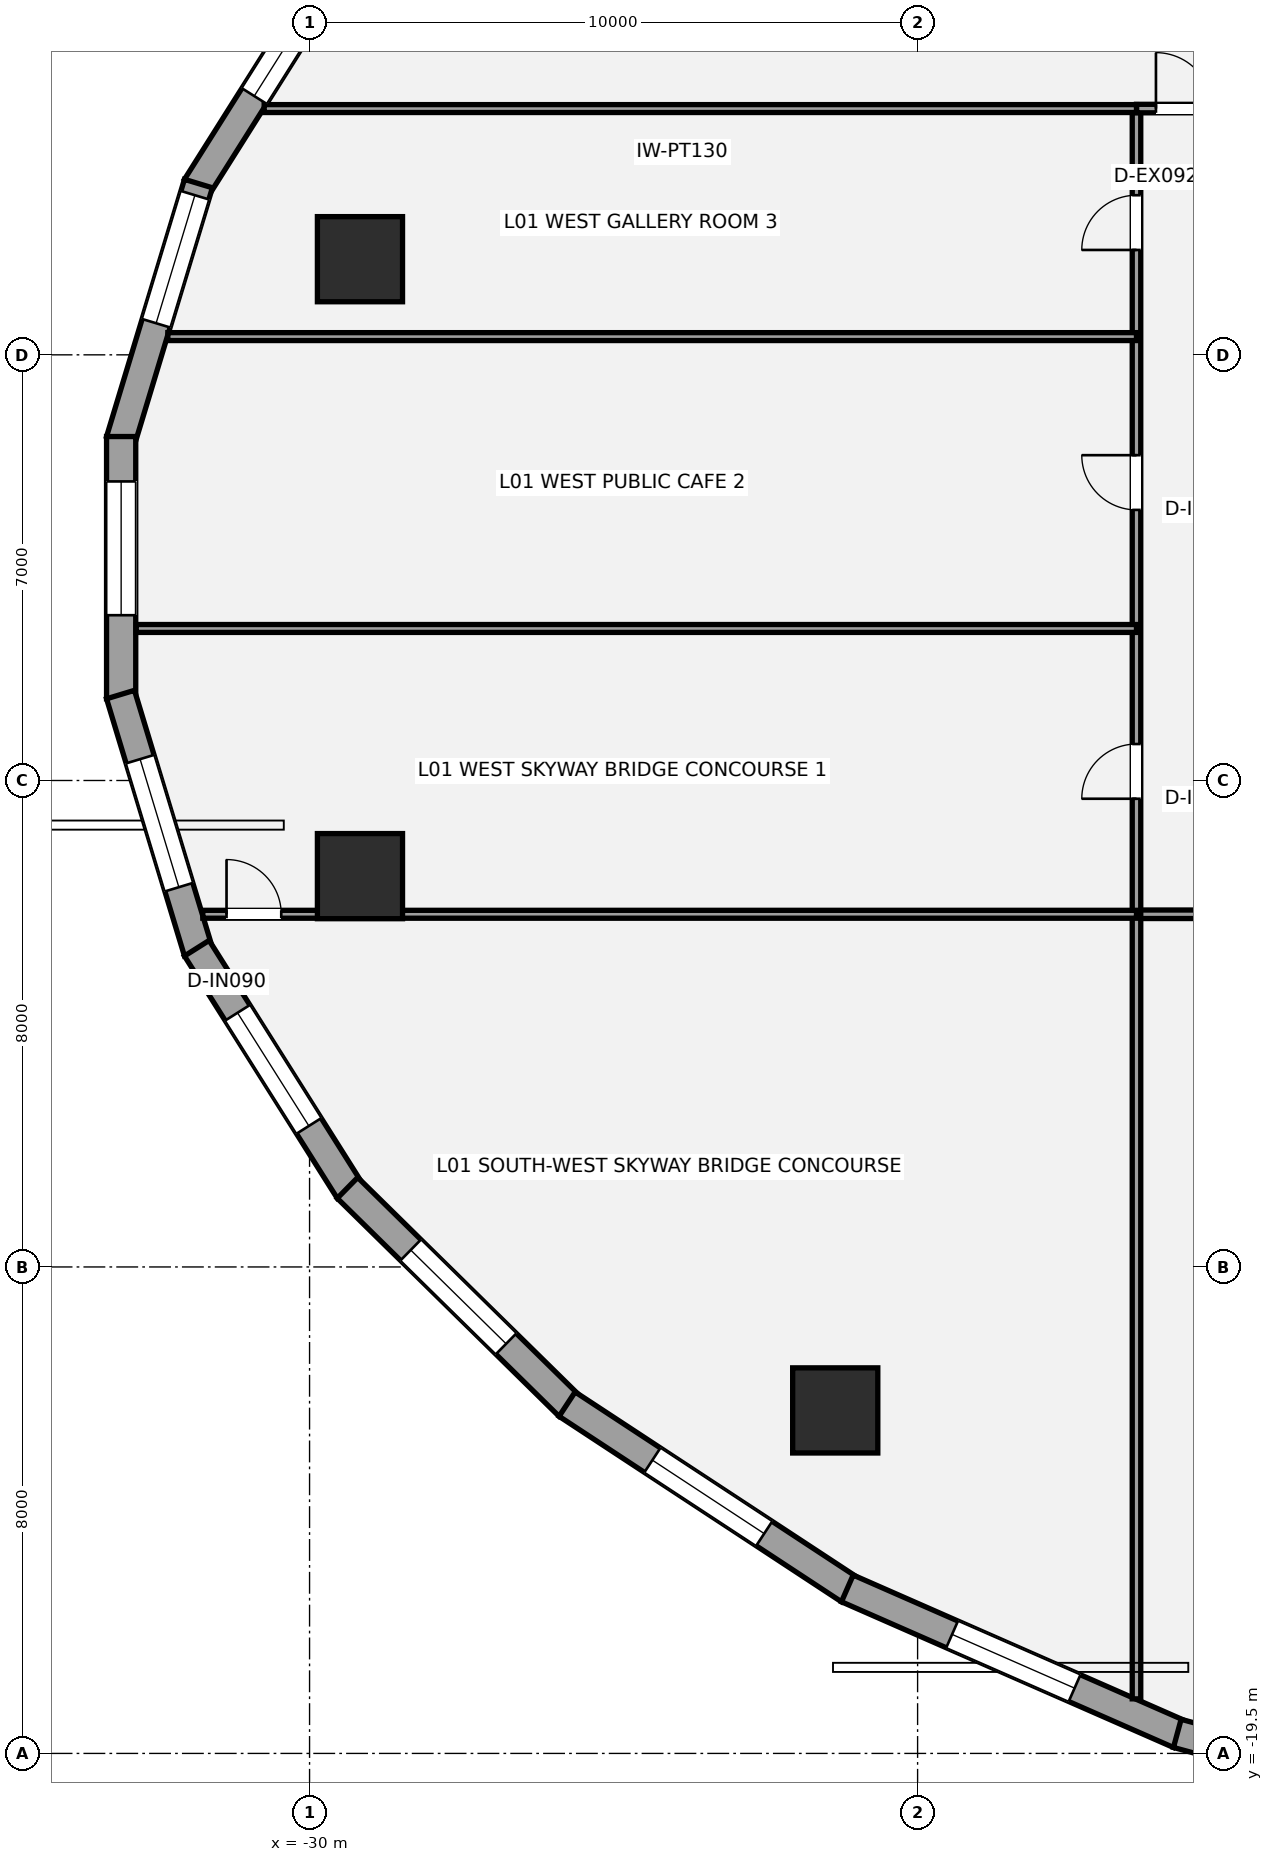
"""IFC4 building model, lengths in metres.
Left out: names, types, materials, properties, quantities, classifications, styles, units other than length and angle.
Written with IfcOpenShell. Run it as: python <this file> out.ifc"""

import sys

from ifc_helpers import new_model, si_unit, direction, frame, frame_2d, origin, origin_2d, place, context, subcontext, project, spatial, rectangle, hollow_circle, extrude, element, fill, save


model = new_model("IFC4")
c1 = context("Model", 3, precision=1e-05, world=origin(), true_north=direction((0.0, 1.0)))
c2 = subcontext(c1, "Body", "Model", "MODEL_VIEW")
j1 = project(units=[si_unit("LENGTHUNIT", "METRE"), si_unit("PLANEANGLEUNIT", "RADIAN")], contexts=[c1])
p1 = place(None, origin())
s1 = spatial("IfcSite", under=j1, at=p1, CompositionType="ELEMENT")
p2 = place(p1, origin())
s2 = spatial("IfcBuilding", under=s1, at=p2, CompositionType="ELEMENT")
p3 = place(p2, frame((0.0, 0.0, 6.0)))
s3 = spatial("IfcBuildingStorey", under=s2, at=p3, CompositionType="ELEMENT", Elevation=6.0)
for number, where, z_axis, x_axis in (
    (1, (-29.171, 5.073, 0.0), (0.0, 0.0, 1.0), (1.0, 0.0, 0.0)),
    (2, (-29.171, -5.073, 0.0), (0.0, 0.0, 1.0), (1.0, 0.0, 0.0)),
    (3, (-21.354, -13.859, 0.0), (0.0, 0.0, 1.0), (1.0, 0.0, 0.0)),
):
    element("IfcColumn", number, at=place(p3, frame(where, z_axis=z_axis, x_axis=x_axis)), inside=s3, PredefinedType="USERDEFINED", context=c2, shape_type="SweptSolid", body=[
        extrude(hollow_circle(Radius=0.7, WallThickness=0.05, at=origin_2d()), origin(), (0.0, 0.0, 1.0), 4.2),
    ])
p4 = place(p3, frame((-31.854, 6.258, 0.0), z_axis=(0.0, 0.0, 1.0), x_axis=(0.53349762721, 0.845801561693, 0.0)))
e4 = element("IfcWall", 4, at=p4, inside=s3, PredefinedType="STANDARD", context=c2, shape_type="SweptSolid", body=[
    extrude(rectangle(XDim=4.711, YDim=0.48, at=frame_2d((2.355, 0.0))), origin(), (0.0, 0.0, 1.0), 3.109),
])
p5 = place(p4, frame((1.771, 0.0, 0.7)))
e5 = element("IfcOpeningElement", 5, at=p5, cuts=e4, PredefinedType="OPENING", context=c2, shape_type="SweptSolid", body=[
    extrude(rectangle(XDim=2.2, YDim=1.95, at=frame_2d((1.1, 0.975))), frame((0.0, 0.25, 0.0), z_axis=(0.0, -1.0, 0.0), x_axis=(1.0, 0.0, 0.0)), (0.0, 0.0, 1.0), 0.5),
])
p6 = place(p3, frame((-33.109, 2.087, 0.0), z_axis=(0.0, 0.0, 1.0), x_axis=(0.289855603468, 0.957070388811, 0.0)))
e6 = element("IfcWall", 6, at=p6, inside=s3, PredefinedType="STANDARD", context=c2, shape_type="SweptSolid", body=[
    extrude(rectangle(XDim=4.419, YDim=0.48, at=frame_2d((2.21, 0.0))), origin(), (0.0, 0.0, 1.0), 3.109),
])
p7 = place(p6, frame((2.02, 0.0, 0.7)))
e7 = element("IfcOpeningElement", 7, at=p7, cuts=e6, PredefinedType="OPENING", context=c2, shape_type="SweptSolid", body=[
    extrude(rectangle(XDim=2.2, YDim=1.95, at=frame_2d((1.1, 0.975))), frame((0.0, 0.25, 0.0), z_axis=(0.0, -1.0, 0.0), x_axis=(1.0, 0.0, 0.0)), (0.0, 0.0, 1.0), 0.5),
])
p8 = place(p3, frame((-33.099, -2.156, 0.0), z_axis=(0.0, 0.0, 1.0), x_axis=(0.0, 1.0, 0.0)))
e8 = element("IfcWall", 8, at=p8, inside=s3, PredefinedType="STANDARD", context=c2, shape_type="SweptSolid", body=[
    extrude(rectangle(XDim=4.313, YDim=0.48, at=frame_2d((2.156, 0.0))), origin(), (0.0, 0.0, 1.0), 3.109),
])
p9 = place(p8, frame((1.375, 0.0, 0.7)))
e9 = element("IfcOpeningElement", 9, at=p9, cuts=e8, PredefinedType="OPENING", context=c2, shape_type="SweptSolid", body=[
    extrude(rectangle(XDim=2.2, YDim=1.95, at=frame_2d((1.1, 0.975))), frame((0.0, 0.25, 0.0), z_axis=(0.0, -1.0, 0.0), x_axis=(1.0, 0.0, 0.0)), (0.0, 0.0, 1.0), 0.5),
])
p10 = place(p3, frame((-31.828, -6.317, 0.0), z_axis=(0.0, 0.0, 1.0), x_axis=(-0.289855603468, 0.957070388811, 0.0)))
e10 = element("IfcWall", 10, at=p10, inside=s3, PredefinedType="STANDARD", context=c2, shape_type="SweptSolid", body=[
    extrude(rectangle(XDim=4.419, YDim=0.48, at=frame_2d((2.21, 0.0))), origin(), (0.0, 0.0, 1.0), 3.109),
])
p11 = place(p10, frame((1.11, 0.0, 0.7)))
e11 = element("IfcOpeningElement", 11, at=p11, cuts=e10, PredefinedType="OPENING", context=c2, shape_type="SweptSolid", body=[
    extrude(rectangle(XDim=2.2, YDim=1.95, at=frame_2d((1.1, 0.975))), frame((0.0, 0.25, 0.0), z_axis=(0.0, -1.0, 0.0), x_axis=(1.0, 0.0, 0.0)), (0.0, 0.0, 1.0), 0.5),
])
p12 = place(p3, frame((-29.341, -10.243, 0.0), z_axis=(0.0, 0.0, 1.0), x_axis=(-0.53349762721, 0.845801561693, 0.0)))
e12 = element("IfcWall", 12, at=p12, inside=s3, PredefinedType="STANDARD", context=c2, shape_type="SweptSolid", body=[
    extrude(rectangle(XDim=4.711, YDim=0.48, at=frame_2d((2.355, 0.0))), origin(), (0.0, 0.0, 1.0), 3.109),
])
p13 = place(p12, frame((1.255, 0.0, 0.7)))
e13 = element("IfcOpeningElement", 13, at=p13, cuts=e12, PredefinedType="OPENING", context=c2, shape_type="SweptSolid", body=[
    extrude(rectangle(XDim=2.2, YDim=1.95, at=frame_2d((1.1, 0.975))), frame((0.0, 0.25, 0.0), z_axis=(0.0, -1.0, 0.0), x_axis=(1.0, 0.0, 0.0)), (0.0, 0.0, 1.0), 0.5),
])
p14 = place(p3, frame((-25.728, -13.785, 0.0), z_axis=(0.0, 0.0, 1.0), x_axis=(-0.713189080178, 0.700971708355, 0.0)))
e14 = element("IfcWall", 14, at=p14, inside=s3, PredefinedType="STANDARD", context=c2, shape_type="SweptSolid", body=[
    extrude(rectangle(XDim=5.116, YDim=0.48, at=frame_2d((2.558, 0.0))), origin(), (0.0, 0.0, 1.0), 3.109),
])
p15 = place(p14, frame((1.458, 0.0, 0.7)))
e15 = element("IfcOpeningElement", 15, at=p15, cuts=e14, PredefinedType="OPENING", context=c2, shape_type="SweptSolid", body=[
    extrude(rectangle(XDim=2.2, YDim=1.95, at=frame_2d((1.1, 0.975))), frame((0.0, 0.25, 0.0), z_axis=(0.0, -1.0, 0.0), x_axis=(1.0, 0.0, 0.0)), (0.0, 0.0, 1.0), 0.5),
])
p16 = place(p3, frame((-21.121, -16.806, 0.0), z_axis=(0.0, 0.0, 1.0), x_axis=(-0.835863918172, 0.548936708827, 0.0)))
e16 = element("IfcWall", 16, at=p16, inside=s3, PredefinedType="STANDARD", context=c2, shape_type="SweptSolid", body=[
    extrude(rectangle(XDim=5.555, YDim=0.48, at=frame_2d((2.778, 0.0))), origin(), (0.0, 0.0, 1.0), 3.109),
])
p17 = place(p16, frame((1.678, 0.0, 0.7)))
e17 = element("IfcOpeningElement", 17, at=p17, cuts=e16, PredefinedType="OPENING", context=c2, shape_type="SweptSolid", body=[
    extrude(rectangle(XDim=2.2, YDim=1.95, at=frame_2d((1.1, 0.975))), frame((0.0, 0.25, 0.0), z_axis=(0.0, -1.0, 0.0), x_axis=(1.0, 0.0, 0.0)), (0.0, 0.0, 1.0), 0.5),
])
p18 = place(p3, frame((-15.695, -19.183, 0.0), z_axis=(0.0, 0.0, 1.0), x_axis=(-0.91570760638, 0.401845218484, 0.0)))
e18 = element("IfcWall", 18, at=p18, inside=s3, PredefinedType="STANDARD", context=c2, shape_type="SweptSolid", body=[
    extrude(rectangle(XDim=5.963, YDim=0.48, at=frame_2d((2.981, 0.0))), origin(), (0.0, 0.0, 1.0), 3.109),
])
p19 = place(p18, frame((1.882, 0.0, 0.7)))
e19 = element("IfcOpeningElement", 19, at=p19, cuts=e18, PredefinedType="OPENING", context=c2, shape_type="SweptSolid", body=[
    extrude(rectangle(XDim=2.2, YDim=1.95, at=frame_2d((1.1, 0.975))), frame((0.0, 0.25, 0.0), z_axis=(0.0, -1.0, 0.0), x_axis=(1.0, 0.0, 0.0)), (0.0, 0.0, 1.0), 0.5),
])
p20 = place(p3, frame((-9.662, -20.821, 0.0), z_axis=(0.0, 0.0, 1.0), x_axis=(-0.964936550718, 0.262483243445, 0.0)))
e20 = element("IfcWall", 20, at=p20, inside=s3, PredefinedType="STANDARD", context=c2, shape_type="SweptSolid", body=[
    extrude(rectangle(XDim=6.288, YDim=0.48, at=frame_2d((3.144, 0.0))), origin(), (0.0, 0.0, 1.0), 3.109),
])
p21 = place(p20, frame((2.044, 0.0, 0.7)))
e21 = element("IfcOpeningElement", 21, at=p21, cuts=e20, PredefinedType="OPENING", context=c2, shape_type="SweptSolid", body=[
    extrude(rectangle(XDim=2.2, YDim=1.95, at=frame_2d((1.1, 0.975))), frame((0.0, 0.25, 0.0), z_axis=(0.0, -1.0, 0.0), x_axis=(1.0, 0.0, 0.0)), (0.0, 0.0, 1.0), 0.5),
])
p22 = place(p3, frame((-16.4, -5.7, 0.0), z_axis=(0.0, 0.0, 1.0), x_axis=(1.0, 0.0, 0.0)))
e22 = element("IfcWall", 22, at=p22, inside=s3, PredefinedType="PARTITIONING", context=c2, shape_type="SweptSolid", body=[
    extrude(rectangle(XDim=32.8, YDim=0.14, at=frame_2d((16.4, 0.0))), origin(), (0.0, 0.0, 1.0), 3.98),
])
p23 = place(p22, frame((4.0, 0.0, 0.0)))
e23 = element("IfcOpeningElement", 23, at=p23, cuts=e22, PredefinedType="OPENING", context=c2, shape_type="SweptSolid", body=[
    extrude(rectangle(XDim=0.9, YDim=2.1, at=frame_2d((0.45, 1.05))), frame((0.0, 0.08, 0.0), z_axis=(0.0, -1.0, 0.0), x_axis=(1.0, 0.0, 0.0)), (0.0, 0.0, 1.0), 0.16),
])
p24 = place(p22, frame((15.95, 0.0, 0.0)))
e24 = element("IfcOpeningElement", 24, at=p24, cuts=e22, PredefinedType="OPENING", context=c2, shape_type="SweptSolid", body=[
    extrude(rectangle(XDim=0.9, YDim=2.1, at=frame_2d((0.45, 1.05))), frame((0.0, 0.08, 0.0), z_axis=(0.0, -1.0, 0.0), x_axis=(1.0, 0.0, 0.0)), (0.0, 0.0, 1.0), 0.16),
])
p25 = place(p22, frame((27.6, 0.0, 0.0)))
e25 = element("IfcOpeningElement", 25, at=p25, cuts=e22, PredefinedType="OPENING", context=c2, shape_type="SweptSolid", body=[
    extrude(rectangle(XDim=1.5, YDim=2.15, at=frame_2d((0.75, 1.075))), frame((0.0, 0.08, 0.0), z_axis=(0.0, -1.0, 0.0), x_axis=(1.0, 0.0, 0.0)), (0.0, 0.0, 1.0), 0.16),
])
p26 = place(p3, frame((-16.4, -18.603, 0.0), z_axis=(0.0, 0.0, 1.0), x_axis=(0.0, 1.0, 0.0)))
e26 = element("IfcWall", 26, at=p26, inside=s3, PredefinedType="PARTITIONING", context=c2, shape_type="SweptSolid", body=[
    extrude(rectangle(XDim=26.153, YDim=0.14, at=frame_2d((13.076, 0.0))), origin(), (0.0, 0.0, 1.0), 3.348),
])
p27 = place(p26, frame((14.802, 0.0, 0.0)))
e27 = element("IfcOpeningElement", 27, at=p27, cuts=e26, PredefinedType="OPENING", context=c2, shape_type="SweptSolid", body=[
    extrude(rectangle(XDim=0.9, YDim=2.1, at=frame_2d((0.45, 1.05))), frame((0.0, 0.08, 0.0), z_axis=(0.0, -1.0, 0.0), x_axis=(1.0, 0.0, 0.0)), (0.0, 0.0, 1.0), 0.16),
])
p28 = place(p26, frame((19.552, 0.0, 0.0)))
e28 = element("IfcOpeningElement", 28, at=p28, cuts=e26, PredefinedType="OPENING", context=c2, shape_type="SweptSolid", body=[
    extrude(rectangle(XDim=0.9, YDim=2.1, at=frame_2d((0.45, 1.05))), frame((0.0, 0.08, 0.0), z_axis=(0.0, -1.0, 0.0), x_axis=(1.0, 0.0, 0.0)), (0.0, 0.0, 1.0), 0.16),
])
p29 = place(p26, frame((23.827, 0.0, 0.0)))
e29 = element("IfcOpeningElement", 29, at=p29, cuts=e26, PredefinedType="OPENING", context=c2, shape_type="SweptSolid", body=[
    extrude(rectangle(XDim=0.9, YDim=2.1, at=frame_2d((0.45, 1.05))), frame((0.0, 0.08, 0.0), z_axis=(0.0, -1.0, 0.0), x_axis=(1.0, 0.0, 0.0)), (0.0, 0.0, 1.0), 0.16),
])
p30 = place(p3, frame((-16.4, 7.55, 0.0), z_axis=(0.0, 0.0, 1.0), x_axis=(1.0, 0.0, 0.0)))
e30 = element("IfcWall", 30, at=p30, inside=s3, PredefinedType="PARTITIONING", context=c2, shape_type="SweptSolid", body=[
    extrude(rectangle(XDim=2.35, YDim=0.14, at=frame_2d((1.175, 0.0))), origin(), (0.0, 0.0, 1.0), 3.433),
])
p31 = place(p30, frame((0.32, 0.0, 0.0)))
e31 = element("IfcOpeningElement", 31, at=p31, cuts=e30, PredefinedType="OPENING", context=c2, shape_type="SweptSolid", body=[
    extrude(rectangle(XDim=0.92, YDim=2.15, at=frame_2d((0.46, 1.075))), frame((0.0, 0.08, 0.0), z_axis=(0.0, -1.0, 0.0), x_axis=(1.0, 0.0, 0.0)), (0.0, 0.0, 1.0), 0.16),
])
p32 = place(p3, frame((-30.747, 7.55, 0.0), z_axis=(0.0, 0.0, 1.0), x_axis=(1.0, 0.0, 0.0)))
e32 = element("IfcWall", 32, at=p32, inside=s3, PredefinedType="PARTITIONING", context=c2, shape_type="SweptSolid", body=[
    extrude(rectangle(XDim=14.347, YDim=0.13, at=frame_2d((7.173, 0.0))), origin(), (0.0, 0.0, 1.0), 2.958),
])
p33 = place(p3, frame((-31.756, -5.7, 0.0), z_axis=(0.0, 0.0, 1.0), x_axis=(1.0, 0.0, 0.0)))
e33 = element("IfcWall", 33, at=p33, inside=s3, PredefinedType="PARTITIONING", context=c2, shape_type="SweptSolid", body=[
    extrude(rectangle(XDim=15.356, YDim=0.13, at=frame_2d((7.678, 0.0))), origin(), (0.0, 0.0, 1.0), 2.958),
])
p34 = place(p33, frame((0.39, 0.0, 0.0)))
e34 = element("IfcOpeningElement", 34, at=p34, cuts=e33, PredefinedType="OPENING", context=c2, shape_type="SweptSolid", body=[
    extrude(rectangle(XDim=0.9, YDim=2.1, at=frame_2d((0.45, 1.05))), frame((0.0, 0.075, 0.0), z_axis=(0.0, -1.0, 0.0), x_axis=(1.0, 0.0, 0.0)), (0.0, 0.0, 1.0), 0.15),
])
p35 = place(p3, frame((-32.851, -1.0, 0.0), z_axis=(0.0, 0.0, 1.0), x_axis=(1.0, 0.0, 0.0)))
e35 = element("IfcWall", 35, at=p35, inside=s3, PredefinedType="PARTITIONING", context=c2, shape_type="SweptSolid", body=[
    extrude(rectangle(XDim=16.451, YDim=0.13, at=frame_2d((8.225, 0.0))), origin(), (0.0, 0.0, 1.0), 3.348),
])
p36 = place(p3, frame((-32.331, 3.8, 0.0), z_axis=(0.0, 0.0, 1.0), x_axis=(1.0, 0.0, 0.0)))
e36 = element("IfcWall", 36, at=p36, inside=s3, PredefinedType="PARTITIONING", context=c2, shape_type="SweptSolid", body=[
    extrude(rectangle(XDim=15.931, YDim=0.13, at=frame_2d((7.966, 0.0))), origin(), (0.0, 0.0, 1.0), 3.348),
])
p37 = place(p5, origin())
e37 = element("IfcWindow", 37, at=p37, inside=s3, PartitioningType="SINGLE_PANEL", PredefinedType="WINDOW", context=c2, shape_type="SweptSolid", body=[
    extrude(rectangle(XDim=2.2, YDim=1.95, at=frame_2d((1.1, 0.975))), frame((0.0, -0.01, 0.0), z_axis=(0.0, -1.0, 0.0), x_axis=(1.0, 0.0, 0.0)), (0.0, 0.0, 1.0), 0.06),
])
fill(e5, e37)
p38 = place(p7, origin())
e38 = element("IfcWindow", 38, at=p38, inside=s3, PartitioningType="SINGLE_PANEL", PredefinedType="WINDOW", context=c2, shape_type="SweptSolid", body=[
    extrude(rectangle(XDim=2.2, YDim=1.95, at=frame_2d((1.1, 0.975))), frame((0.0, -0.01, 0.0), z_axis=(0.0, -1.0, 0.0), x_axis=(1.0, 0.0, 0.0)), (0.0, 0.0, 1.0), 0.06),
])
fill(e7, e38)
p39 = place(p9, origin())
e39 = element("IfcWindow", 39, at=p39, inside=s3, PartitioningType="SINGLE_PANEL", PredefinedType="WINDOW", context=c2, shape_type="SweptSolid", body=[
    extrude(rectangle(XDim=2.2, YDim=1.95, at=frame_2d((1.1, 0.975))), frame((0.0, -0.01, 0.0), z_axis=(0.0, -1.0, 0.0), x_axis=(1.0, 0.0, 0.0)), (0.0, 0.0, 1.0), 0.06),
])
fill(e9, e39)
p40 = place(p11, origin())
e40 = element("IfcWindow", 40, at=p40, inside=s3, PartitioningType="SINGLE_PANEL", PredefinedType="WINDOW", context=c2, shape_type="SweptSolid", body=[
    extrude(rectangle(XDim=2.2, YDim=1.95, at=frame_2d((1.1, 0.975))), frame((0.0, -0.01, 0.0), z_axis=(0.0, -1.0, 0.0), x_axis=(1.0, 0.0, 0.0)), (0.0, 0.0, 1.0), 0.06),
])
fill(e11, e40)
p41 = place(p13, origin())
e41 = element("IfcWindow", 41, at=p41, inside=s3, PartitioningType="SINGLE_PANEL", PredefinedType="WINDOW", context=c2, shape_type="SweptSolid", body=[
    extrude(rectangle(XDim=2.2, YDim=1.95, at=frame_2d((1.1, 0.975))), frame((0.0, -0.01, 0.0), z_axis=(0.0, -1.0, 0.0), x_axis=(1.0, 0.0, 0.0)), (0.0, 0.0, 1.0), 0.06),
])
fill(e13, e41)
p42 = place(p15, origin())
e42 = element("IfcWindow", 42, at=p42, inside=s3, PartitioningType="SINGLE_PANEL", PredefinedType="WINDOW", context=c2, shape_type="SweptSolid", body=[
    extrude(rectangle(XDim=2.2, YDim=1.95, at=frame_2d((1.1, 0.975))), frame((0.0, -0.01, 0.0), z_axis=(0.0, -1.0, 0.0), x_axis=(1.0, 0.0, 0.0)), (0.0, 0.0, 1.0), 0.06),
])
fill(e15, e42)
p43 = place(p17, origin())
e43 = element("IfcWindow", 43, at=p43, inside=s3, PartitioningType="SINGLE_PANEL", PredefinedType="WINDOW", context=c2, shape_type="SweptSolid", body=[
    extrude(rectangle(XDim=2.2, YDim=1.95, at=frame_2d((1.1, 0.975))), frame((0.0, -0.01, 0.0), z_axis=(0.0, -1.0, 0.0), x_axis=(1.0, 0.0, 0.0)), (0.0, 0.0, 1.0), 0.06),
])
fill(e17, e43)
p44 = place(p19, origin())
e44 = element("IfcWindow", 44, at=p44, inside=s3, PartitioningType="SINGLE_PANEL", PredefinedType="WINDOW", context=c2, shape_type="SweptSolid", body=[
    extrude(rectangle(XDim=2.2, YDim=1.95, at=frame_2d((1.1, 0.975))), frame((0.0, -0.01, 0.0), z_axis=(0.0, -1.0, 0.0), x_axis=(1.0, 0.0, 0.0)), (0.0, 0.0, 1.0), 0.06),
])
fill(e19, e44)
p45 = place(p31, origin())
e45 = element("IfcDoor", 45, at=p45, inside=s3, OperationType="SINGLE_SWING_LEFT", PredefinedType="DOOR", context=c2, shape_type="SweptSolid", body=[
    extrude(rectangle(XDim=0.92, YDim=2.15, at=frame_2d((0.46, 1.075))), frame((0.0, 0.025, 0.0), z_axis=(0.0, -1.0, 0.0), x_axis=(1.0, 0.0, 0.0)), (0.0, 0.0, 1.0), 0.05),
])
fill(e31, e45)
p46 = place(p34, origin())
e46 = element("IfcDoor", 46, at=p46, inside=s3, OperationType="SINGLE_SWING_LEFT", PredefinedType="DOOR", context=c2, shape_type="SweptSolid", body=[
    extrude(rectangle(XDim=0.9, YDim=2.1, at=frame_2d((0.45, 1.05))), frame((0.0, 0.025, 0.0), z_axis=(0.0, -1.0, 0.0), x_axis=(1.0, 0.0, 0.0)), (0.0, 0.0, 1.0), 0.05),
])
fill(e34, e46)
p47 = place(p27, origin())
e47 = element("IfcDoor", 47, at=p47, inside=s3, OperationType="SINGLE_SWING_LEFT", PredefinedType="DOOR", context=c2, shape_type="SweptSolid", body=[
    extrude(rectangle(XDim=0.9, YDim=2.1, at=frame_2d((0.45, 1.05))), frame((0.0, 0.025, 0.0), z_axis=(0.0, -1.0, 0.0), x_axis=(1.0, 0.0, 0.0)), (0.0, 0.0, 1.0), 0.05),
])
fill(e27, e47)
p48 = place(p28, origin())
e48 = element("IfcDoor", 48, at=p48, inside=s3, OperationType="SINGLE_SWING_RIGHT", PredefinedType="DOOR", context=c2, shape_type="SweptSolid", body=[
    extrude(rectangle(XDim=0.9, YDim=2.1, at=frame_2d((0.45, 1.05))), frame((0.0, 0.025, 0.0), z_axis=(0.0, -1.0, 0.0), x_axis=(1.0, 0.0, 0.0)), (0.0, 0.0, 1.0), 0.05),
])
fill(e28, e48)
p49 = place(p29, origin())
e49 = element("IfcDoor", 49, at=p49, inside=s3, OperationType="SINGLE_SWING_LEFT", PredefinedType="DOOR", context=c2, shape_type="SweptSolid", body=[
    extrude(rectangle(XDim=0.9, YDim=2.1, at=frame_2d((0.45, 1.05))), frame((0.0, 0.025, 0.0), z_axis=(0.0, -1.0, 0.0), x_axis=(1.0, 0.0, 0.0)), (0.0, 0.0, 1.0), 0.05),
])
fill(e29, e49)
save(model, sys.argv[1])
